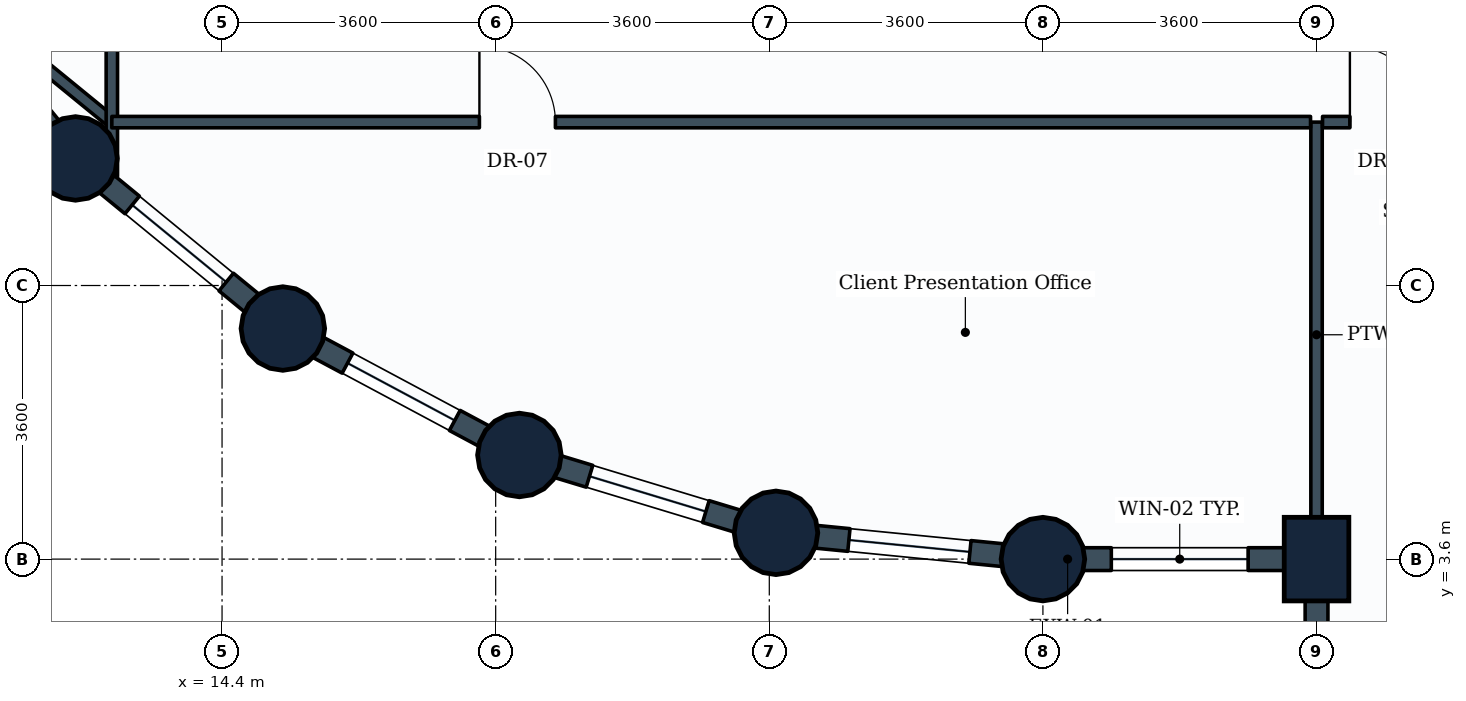
"""IFC4 building model, lengths in metres.
Left out: names, types, materials, properties, quantities, classifications, styles, units other than length and angle.
Written with IfcOpenShell. Run it as: python <this file> out.ifc"""

import sys

from ifc_helpers import new_model, si_unit, direction, frame, frame_2d, origin, origin_2d, place, context, subcontext, project, spatial, rectangle, circle, extrude, element, fill, save


model = new_model("IFC4")
c1 = context("Model", 3, precision=1e-05, world=origin(), true_north=direction((0.0, 1.0)))
c2 = subcontext(c1, "Body", "Model", "MODEL_VIEW")
j1 = project(units=[si_unit("LENGTHUNIT", "METRE"), si_unit("PLANEANGLEUNIT", "RADIAN")], contexts=[c1])
p1 = place(None, origin())
s1 = spatial("IfcSite", under=j1, at=p1, CompositionType="ELEMENT")
p2 = place(p1, origin())
s2 = spatial("IfcBuilding", under=s1, at=p2, CompositionType="ELEMENT")
p3 = place(p2, frame((0.0, 0.0, 103.5)))
s3 = spatial("IfcBuildingStorey", under=s2, at=p3, CompositionType="ELEMENT", Elevation=103.5)
for number, where, z_axis, x_axis in (
    (1, (12.472, 8.872, 0.0), (0.0, 0.0, 1.0), (1.0, 0.0, 0.0)),
    (2, (15.2, 6.634, 0.0), (0.0, 0.0, 1.0), (1.0, 0.0, 0.0)),
    (3, (18.312, 4.97, 0.0), (0.0, 0.0, 1.0), (1.0, 0.0, 0.0)),
    (4, (21.688, 3.946, 0.0), (0.0, 0.0, 1.0), (1.0, 0.0, 0.0)),
    (5, (25.2, 3.6, 0.0), (0.0, 0.0, 1.0), (1.0, 0.0, 0.0)),
):
    element("IfcColumn", number, at=place(p3, frame(where, z_axis=z_axis, x_axis=x_axis)), inside=s3, PredefinedType="COLUMN", context=c2, shape_type="SweptSolid", body=[
        extrude(circle(Radius=0.55, at=origin_2d()), origin(), (0.0, 0.0, 1.0), 3.9),
    ])
p4 = place(p3, frame((28.8, 3.6, 0.0), z_axis=(0.0, 0.0, 1.0), x_axis=(1.0, 0.0, 0.0)))
e6 = element("IfcColumn", 6, at=p4, inside=s3, PredefinedType="COLUMN", context=c2, shape_type="SweptSolid", body=[
    extrude(rectangle(XDim=0.85, YDim=1.1, at=origin_2d()), origin(), (0.0, 0.0, 1.0), 3.9),
])
p5 = place(p3, frame((28.8, 3.6, 0.0), z_axis=(0.0, 0.0, 1.0), x_axis=(-1.0, 0.0, 0.0)))
e7 = element("IfcWall", 7, at=p5, inside=s3, PredefinedType="STANDARD", context=c2, shape_type="SweptSolid", body=[
    extrude(rectangle(XDim=3.6, YDim=0.3, at=frame_2d((1.8, 0.0))), origin(), (0.0, 0.0, 1.0), 2.93),
])
p6 = place(p5, frame((0.9, 0.0, 0.85)))
e8 = element("IfcOpeningElement", 8, at=p6, cuts=e7, PredefinedType="OPENING", context=c2, shape_type="SweptSolid", body=[
    extrude(rectangle(XDim=1.8, YDim=1.35, at=frame_2d((0.9, 0.675))), frame((0.0, 0.16, 0.0), z_axis=(0.0, -1.0, 0.0), x_axis=(1.0, 0.0, 0.0)), (0.0, 0.0, 1.0), 0.32),
])
p7 = place(p3, frame((28.8, 3.6, 0.0), z_axis=(0.0, 0.0, 1.0), x_axis=(0.0, -1.0, 0.0)))
e9 = element("IfcWall", 9, at=p7, inside=s3, PredefinedType="STANDARD", context=c2, shape_type="SweptSolid", body=[
    extrude(rectangle(XDim=2.1, YDim=0.3, at=frame_2d((1.05, 0.0))), origin(), (0.0, 0.0, 1.0), 2.93),
])
p8 = place(p3, frame((12.472, 8.872, 0.0), z_axis=(0.0, 0.0, 1.0), x_axis=(-0.634258295121, 0.773121216285, 0.0)))
e10 = element("IfcWall", 10, at=p8, inside=s3, PredefinedType="STANDARD", context=c2, shape_type="SweptSolid", body=[
    extrude(rectangle(XDim=3.529, YDim=0.3, at=frame_2d((1.764, 0.0))), origin(), (0.0, 0.0, 1.0), 2.93),
])
p9 = place(p3, frame((15.2, 6.634, 0.0), z_axis=(0.0, 0.0, 1.0), x_axis=(-0.773121216285, 0.634258295121, 0.0)))
e11 = element("IfcWall", 11, at=p9, inside=s3, PredefinedType="STANDARD", context=c2, shape_type="SweptSolid", body=[
    extrude(rectangle(XDim=3.529, YDim=0.3, at=frame_2d((1.764, 0.0))), origin(), (0.0, 0.0, 1.0), 2.93),
])
p10 = place(p9, frame((0.964, 0.0, 0.85)))
e12 = element("IfcOpeningElement", 12, at=p10, cuts=e11, PredefinedType="OPENING", context=c2, shape_type="SweptSolid", body=[
    extrude(rectangle(XDim=1.6, YDim=1.35, at=frame_2d((0.8, 0.675))), frame((0.0, 0.16, 0.0), z_axis=(0.0, -1.0, 0.0), x_axis=(1.0, 0.0, 0.0)), (0.0, 0.0, 1.0), 0.32),
])
p11 = place(p3, frame((18.312, 4.97, 0.0), z_axis=(0.0, 0.0, 1.0), x_axis=(-0.881846862014, 0.471535907389, 0.0)))
e13 = element("IfcWall", 13, at=p11, inside=s3, PredefinedType="STANDARD", context=c2, shape_type="SweptSolid", body=[
    extrude(rectangle(XDim=3.529, YDim=0.3, at=frame_2d((1.765, 0.0))), origin(), (0.0, 0.0, 1.0), 2.93),
])
p12 = place(p11, frame((0.964, 0.0, 0.85)))
e14 = element("IfcOpeningElement", 14, at=p12, cuts=e13, PredefinedType="OPENING", context=c2, shape_type="SweptSolid", body=[
    extrude(rectangle(XDim=1.6, YDim=1.35, at=frame_2d((0.8, 0.675))), frame((0.0, 0.16, 0.0), z_axis=(0.0, -1.0, 0.0), x_axis=(1.0, 0.0, 0.0)), (0.0, 0.0, 1.0), 0.32),
])
p13 = place(p3, frame((21.688, 3.946, 0.0), z_axis=(0.0, 0.0, 1.0), x_axis=(-0.956953367403, 0.290241714123, 0.0)))
e15 = element("IfcWall", 15, at=p13, inside=s3, PredefinedType="STANDARD", context=c2, shape_type="SweptSolid", body=[
    extrude(rectangle(XDim=3.528, YDim=0.3, at=frame_2d((1.764, 0.0))), origin(), (0.0, 0.0, 1.0), 2.93),
])
p14 = place(p13, frame((0.964, 0.0, 0.85)))
e16 = element("IfcOpeningElement", 16, at=p14, cuts=e15, PredefinedType="OPENING", context=c2, shape_type="SweptSolid", body=[
    extrude(rectangle(XDim=1.6, YDim=1.35, at=frame_2d((0.8, 0.675))), frame((0.0, 0.16, 0.0), z_axis=(0.0, -1.0, 0.0), x_axis=(1.0, 0.0, 0.0)), (0.0, 0.0, 1.0), 0.32),
])
p15 = place(p3, frame((25.2, 3.6, 0.0), z_axis=(0.0, 0.0, 1.0), x_axis=(-0.995183369056, 0.098030923459, 0.0)))
e17 = element("IfcWall", 17, at=p15, inside=s3, PredefinedType="STANDARD", context=c2, shape_type="SweptSolid", body=[
    extrude(rectangle(XDim=3.529, YDim=0.3, at=frame_2d((1.765, 0.0))), origin(), (0.0, 0.0, 1.0), 2.93),
])
p16 = place(p15, frame((0.965, 0.0, 0.85)))
e18 = element("IfcOpeningElement", 18, at=p16, cuts=e17, PredefinedType="OPENING", context=c2, shape_type="SweptSolid", body=[
    extrude(rectangle(XDim=1.6, YDim=1.35, at=frame_2d((0.8, 0.675))), frame((0.0, 0.16, 0.0), z_axis=(0.0, -1.0, 0.0), x_axis=(1.0, 0.0, 0.0)), (0.0, 0.0, 1.0), 0.32),
])
p17 = place(p3, frame((28.8, 9.35, 0.0), z_axis=(0.0, 0.0, 1.0), x_axis=(0.0, -1.0, 0.0)))
e19 = element("IfcWall", 19, at=p17, inside=s3, PredefinedType="PARTITIONING", context=c2, shape_type="SweptSolid", body=[
    extrude(rectangle(XDim=5.596, YDim=0.15, at=frame_2d((2.798, 0.0))), origin(), (0.0, 0.0, 1.0), 3.635),
])
p18 = place(p3, frame((12.95, 9.35, 0.0), z_axis=(0.0, 0.0, 1.0), x_axis=(-0.774315108081, 0.632800216022, 0.0)))
e20 = element("IfcWall", 20, at=p18, inside=s3, PredefinedType="PARTITIONING", context=c2, shape_type="SweptSolid", body=[
    extrude(rectangle(XDim=2.37, YDim=0.15, at=frame_2d((1.185, 0.0))), origin(), (0.0, 0.0, 1.0), 2.93),
])
p19 = place(p3, frame((12.95, 8.634, 0.0), z_axis=(0.0, 0.0, 1.0), x_axis=(0.0, 1.0, 0.0)))
e21 = element("IfcWall", 21, at=p19, inside=s3, PredefinedType="PARTITIONING", context=c2, shape_type="SweptSolid", body=[
    extrude(rectangle(XDim=7.887, YDim=0.15, at=frame_2d((3.944, 0.0))), origin(), (0.0, 0.0, 1.0), 2.93),
])
p20 = place(p19, frame((4.947, 0.0, 0.0)))
e22 = element("IfcOpeningElement", 22, at=p20, cuts=e21, PredefinedType="OPENING", context=c2, shape_type="SweptSolid", body=[
    extrude(rectangle(XDim=1.0, YDim=2.1, at=frame_2d((0.5, 1.05))), frame((0.0, 0.085, 0.0), z_axis=(0.0, -1.0, 0.0), x_axis=(1.0, 0.0, 0.0)), (0.0, 0.0, 1.0), 0.17),
])
p21 = place(p3, frame((12.95, 9.35, 0.0), z_axis=(0.0, 0.0, 1.0), x_axis=(1.0, 0.0, 0.0)))
e23 = element("IfcWall", 23, at=p21, inside=s3, PredefinedType="PARTITIONING", context=c2, shape_type="SweptSolid", body=[
    extrude(rectangle(XDim=15.771, YDim=0.15, at=frame_2d((7.885, 0.0))), origin(), (0.0, 0.0, 1.0), 3.18),
])
p22 = place(p21, frame((4.836, 0.0, 0.0)))
e24 = element("IfcOpeningElement", 24, at=p22, cuts=e23, PredefinedType="OPENING", context=c2, shape_type="SweptSolid", body=[
    extrude(rectangle(XDim=1.0, YDim=2.1, at=frame_2d((0.5, 1.05))), frame((0.0, 0.085, 0.0), z_axis=(0.0, -1.0, 0.0), x_axis=(1.0, 0.0, 0.0)), (0.0, 0.0, 1.0), 0.17),
])
p23 = place(p3, frame((28.879, 9.35, 0.0), z_axis=(0.0, 0.0, 1.0), x_axis=(1.0, 0.0, 0.0)))
e25 = element("IfcWall", 25, at=p23, inside=s3, PredefinedType="PARTITIONING", context=c2, shape_type="SweptSolid", body=[
    extrude(rectangle(XDim=5.521, YDim=0.15, at=frame_2d((2.76, 0.0))), origin(), (0.0, 0.0, 1.0), 3.635),
])
p24 = place(p23, frame((0.36, 0.0, 0.0)))
e26 = element("IfcOpeningElement", 26, at=p24, cuts=e25, PredefinedType="OPENING", context=c2, shape_type="SweptSolid", body=[
    extrude(rectangle(XDim=1.0, YDim=2.1, at=frame_2d((0.5, 1.05))), frame((0.0, 0.085, 0.0), z_axis=(0.0, -1.0, 0.0), x_axis=(1.0, 0.0, 0.0)), (0.0, 0.0, 1.0), 0.17),
])
p25 = place(p6, origin())
e27 = element("IfcWindow", 27, at=p25, inside=s3, PartitioningType="SINGLE_PANEL", PredefinedType="WINDOW", context=c2, shape_type="SweptSolid", body=[
    extrude(rectangle(XDim=1.8, YDim=1.35, at=frame_2d((0.9, 0.675))), frame((0.0, 0.03, 0.0), z_axis=(0.0, -1.0, 0.0), x_axis=(1.0, 0.0, 0.0)), (0.0, 0.0, 1.0), 0.06),
])
fill(e8, e27)
p26 = place(p10, origin())
e28 = element("IfcWindow", 28, at=p26, inside=s3, PartitioningType="SINGLE_PANEL", PredefinedType="WINDOW", context=c2, shape_type="SweptSolid", body=[
    extrude(rectangle(XDim=1.6, YDim=1.35, at=frame_2d((0.8, 0.675))), frame((0.0, 0.03, 0.0), z_axis=(0.0, -1.0, 0.0), x_axis=(1.0, 0.0, 0.0)), (0.0, 0.0, 1.0), 0.06),
])
fill(e12, e28)
p27 = place(p12, origin())
e29 = element("IfcWindow", 29, at=p27, inside=s3, PartitioningType="SINGLE_PANEL", PredefinedType="WINDOW", context=c2, shape_type="SweptSolid", body=[
    extrude(rectangle(XDim=1.6, YDim=1.35, at=frame_2d((0.8, 0.675))), frame((0.0, 0.03, 0.0), z_axis=(0.0, -1.0, 0.0), x_axis=(1.0, 0.0, 0.0)), (0.0, 0.0, 1.0), 0.06),
])
fill(e14, e29)
p28 = place(p14, origin())
e30 = element("IfcWindow", 30, at=p28, inside=s3, PartitioningType="SINGLE_PANEL", PredefinedType="WINDOW", context=c2, shape_type="SweptSolid", body=[
    extrude(rectangle(XDim=1.6, YDim=1.35, at=frame_2d((0.8, 0.675))), frame((0.0, 0.03, 0.0), z_axis=(0.0, -1.0, 0.0), x_axis=(1.0, 0.0, 0.0)), (0.0, 0.0, 1.0), 0.06),
])
fill(e16, e30)
p29 = place(p16, origin())
e31 = element("IfcWindow", 31, at=p29, inside=s3, PartitioningType="SINGLE_PANEL", PredefinedType="WINDOW", context=c2, shape_type="SweptSolid", body=[
    extrude(rectangle(XDim=1.6, YDim=1.35, at=frame_2d((0.8, 0.675))), frame((0.0, 0.03, 0.0), z_axis=(0.0, -1.0, 0.0), x_axis=(1.0, 0.0, 0.0)), (0.0, 0.0, 1.0), 0.06),
])
fill(e18, e31)
p30 = place(p22, origin())
e32 = element("IfcDoor", 32, at=p30, inside=s3, OperationType="SINGLE_SWING_LEFT", PredefinedType="DOOR", context=c2, shape_type="SweptSolid", body=[
    extrude(rectangle(XDim=1.0, YDim=2.1, at=frame_2d((0.5, 1.05))), frame((0.0, 0.025, 0.0), z_axis=(0.0, -1.0, 0.0), x_axis=(1.0, 0.0, 0.0)), (0.0, 0.0, 1.0), 0.05),
])
fill(e24, e32)
p31 = place(p24, origin())
e33 = element("IfcDoor", 33, at=p31, inside=s3, OperationType="SINGLE_SWING_LEFT", PredefinedType="DOOR", context=c2, shape_type="SweptSolid", body=[
    extrude(rectangle(XDim=1.0, YDim=2.1, at=frame_2d((0.5, 1.05))), frame((0.0, 0.025, 0.0), z_axis=(0.0, -1.0, 0.0), x_axis=(1.0, 0.0, 0.0)), (0.0, 0.0, 1.0), 0.05),
])
fill(e26, e33)
save(model, sys.argv[1])
